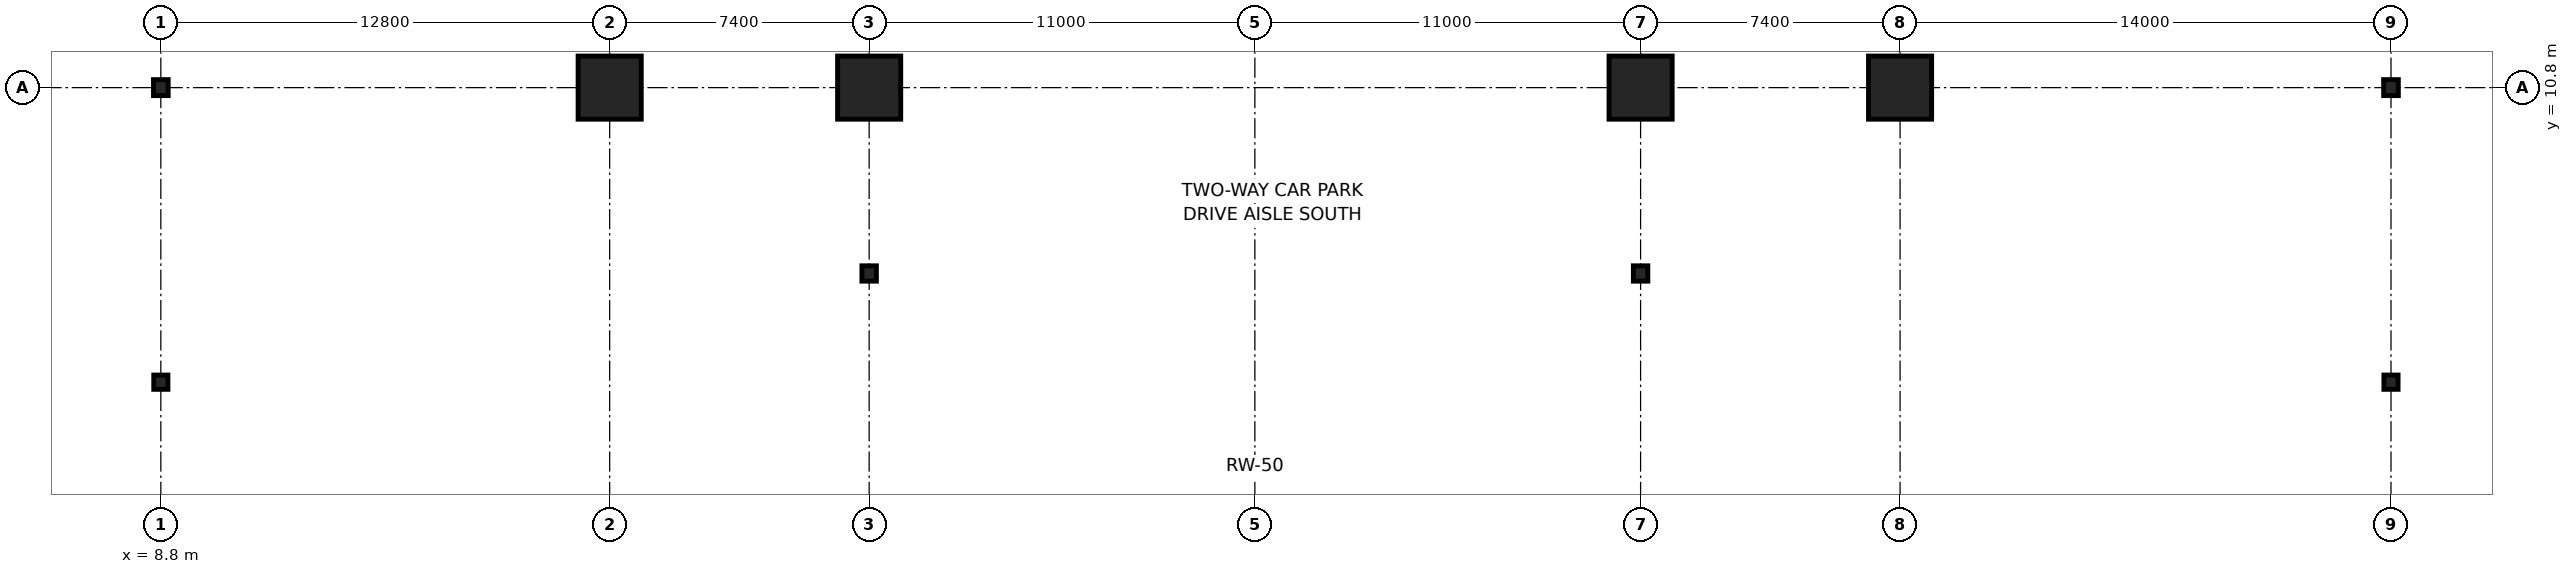
"""IFC4 building model, lengths in metres.
Left out: names, types, materials, properties, quantities, classifications, styles, units other than length and angle.
Written with IfcOpenShell. Run it as: python <this file> out.ifc"""

import sys

from ifc_helpers import new_model, si_unit, direction, frame, origin, origin_2d, place, context, subcontext, project, spatial, rectangle, i_section, extrude, element, save


model = new_model("IFC4")
c1 = context("Model", 3, precision=1e-05, world=origin(), true_north=direction((0.0, 1.0)))
c2 = subcontext(c1, "Body", "Model", "MODEL_VIEW")
j1 = project(units=[si_unit("LENGTHUNIT", "METRE"), si_unit("PLANEANGLEUNIT", "RADIAN")], contexts=[c1])
p1 = place(None, origin())
s1 = spatial("IfcSite", under=j1, at=p1, CompositionType="ELEMENT")
p2 = place(p1, origin())
s2 = spatial("IfcBuilding", under=s1, at=p2, CompositionType="ELEMENT")
p3 = place(p2, frame((0.0, 0.0, -9.0)))
s3 = spatial("IfcBuildingStorey", under=s2, at=p3, CompositionType="ELEMENT", Elevation=-9.0)
for number, where, z_axis, x_axis in (
    (1, (29.0, 10.8, -0.3), (0.0, 0.0, 1.0), (1.0, 0.0, 0.0)),
    (2, (51.0, 10.8, -0.3), (0.0, 0.0, 1.0), (1.0, 0.0, 0.0)),
    (3, (21.6, 10.8, -0.3), (0.0, 0.0, 1.0), (1.0, 0.0, 0.0)),
    (4, (58.4, 10.8, -0.3), (0.0, 0.0, 1.0), (1.0, 0.0, 0.0)),
):
    element("IfcColumn", number, at=place(p3, frame(where, z_axis=z_axis, x_axis=x_axis)), inside=s3, PredefinedType="COLUMN", context=c2, shape_type="SweptSolid", body=[
        extrude(rectangle(XDim=1.8, YDim=1.8, at=origin_2d()), origin(), (0.0, 0.0, 1.0), 4.8),
    ])
for number, where, z_axis, x_axis in (
    (5, (29.0, 5.5, -0.3), (0.0, 0.0, 1.0), (1.0, 0.0, 0.0)),
    (6, (51.0, 5.5, -0.3), (0.0, 0.0, 1.0), (1.0, 0.0, 0.0)),
):
    element("IfcColumn", number, at=place(p3, frame(where, z_axis=z_axis, x_axis=x_axis)), inside=s3, PredefinedType="COLUMN", context=c2, shape_type="SweptSolid", body=[
        extrude(i_section(OverallWidth=0.412, OverallDepth=0.437, WebThickness=0.036, FlangeThickness=0.058, FilletRadius=0.015, at=origin_2d()), origin(), (0.0, 0.0, 1.0), 4.8),
    ])
for number, where, z_axis, x_axis in (
    (7, (8.8, 10.8, -0.3), (0.0, 0.0, 1.0), (1.0, 0.0, 0.0)),
    (8, (72.4, 10.8, -0.3), (0.0, 0.0, 1.0), (1.0, 0.0, 0.0)),
):
    element("IfcColumn", number, at=place(p3, frame(where, z_axis=z_axis, x_axis=x_axis)), inside=s3, PredefinedType="COLUMN", context=c2, shape_type="SweptSolid", body=[
        extrude(i_section(OverallWidth=0.418, OverallDepth=0.456, WebThickness=0.042, FlangeThickness=0.067, FilletRadius=0.015, at=origin_2d()), origin(), (0.0, 0.0, 1.0), 4.8),
    ])
for number, where, z_axis, x_axis in (
    (9, (8.8, 2.4, -0.3), (0.0, 0.0, 1.0), (1.0, 0.0, 0.0)),
    (10, (72.4, 2.4, -0.3), (0.0, 0.0, 1.0), (1.0, 0.0, 0.0)),
):
    element("IfcColumn", number, at=place(p3, frame(where, z_axis=z_axis, x_axis=x_axis)), inside=s3, PredefinedType="COLUMN", context=c2, shape_type="SweptSolid", body=[
        extrude(i_section(OverallWidth=0.403, OverallDepth=0.406, WebThickness=0.027, FlangeThickness=0.043, FilletRadius=0.015, at=origin_2d()), origin(), (0.0, 0.0, 1.0), 4.8),
    ])
save(model, sys.argv[1])
